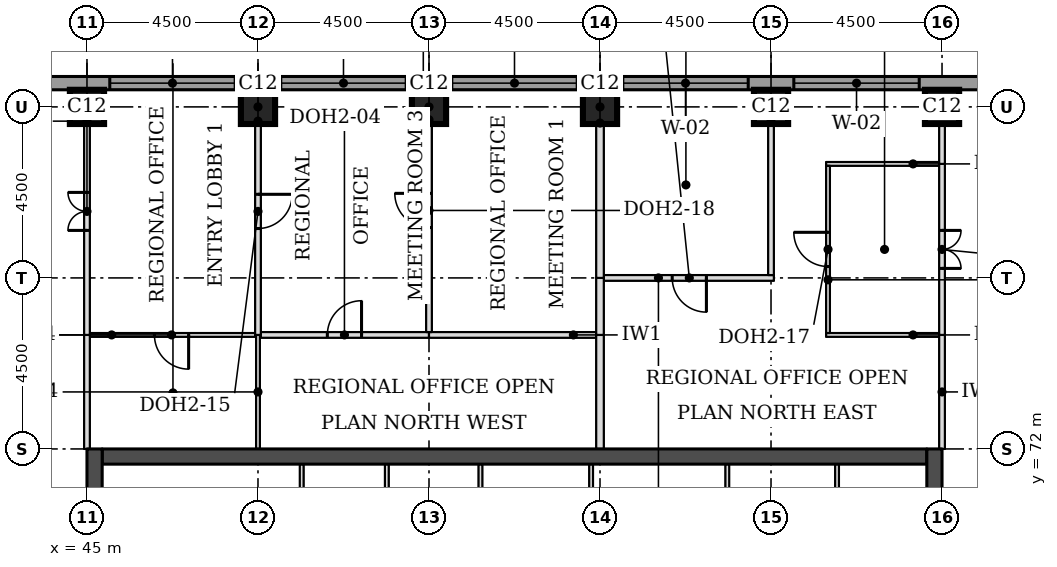
"""IFC4 building model, lengths in metres.
Left out: names, types, materials, properties, quantities, classifications, styles, units other than length and angle.
Written with IfcOpenShell. Run it as: python <this file> out.ifc"""

import sys

from ifc_helpers import new_model, si_unit, direction, frame, frame_2d, origin, origin_2d, place, context, subcontext, project, spatial, rectangle, extrude, element, fill, save


model = new_model("IFC4")
c1 = context("Model", 3, precision=1e-05, world=origin(), true_north=direction((0.0, 1.0)))
c2 = subcontext(c1, "Body", "Model", "MODEL_VIEW")
j1 = project(units=[si_unit("LENGTHUNIT", "METRE"), si_unit("PLANEANGLEUNIT", "RADIAN")], contexts=[c1])
p1 = place(None, origin())
s1 = spatial("IfcSite", under=j1, at=p1, CompositionType="ELEMENT")
p2 = place(p1, origin())
s2 = spatial("IfcBuilding", under=s1, at=p2, CompositionType="ELEMENT")
p3 = place(p2, frame((0.0, 0.0, 158.8)))
s3 = spatial("IfcBuildingStorey", under=s2, at=p3, CompositionType="ELEMENT", Elevation=158.8)
for number, where, z_axis, x_axis in (
    (1, (45.0, 81.0, 0.0), (0.0, 0.0, 1.0), (1.0, 0.0, 0.0)),
    (2, (49.5, 81.0, 0.0), (0.0, 0.0, 1.0), (1.0, 0.0, 0.0)),
    (3, (54.0, 81.0, 0.0), (0.0, 0.0, 1.0), (1.0, 0.0, 0.0)),
    (4, (58.5, 81.0, 0.0), (0.0, 0.0, 1.0), (1.0, 0.0, 0.0)),
    (5, (63.0, 81.0, 0.0), (0.0, 0.0, 1.0), (1.0, 0.0, 0.0)),
    (6, (67.5, 81.0, 0.0), (0.0, 0.0, 1.0), (1.0, 0.0, 0.0)),
):
    element("IfcColumn", number, at=place(p3, frame(where, z_axis=z_axis, x_axis=x_axis)), inside=s3, PredefinedType="COLUMN", context=c2, shape_type="SweptSolid", body=[
        extrude(rectangle(XDim=0.9, YDim=0.9, at=origin_2d()), origin(), (0.0, 0.0, 1.0), 3.7),
    ])
p4 = place(p3, frame((45.4, 71.8, 0.0), z_axis=(0.0, 0.0, 1.0), x_axis=(1.0, 0.0, 0.0)))
e7 = element("IfcWall", 7, at=p4, inside=s3, PredefinedType="SHEAR", context=c2, shape_type="SweptSolid", body=[
    extrude(rectangle(XDim=21.7, YDim=0.4, at=frame_2d((10.85, 0.0))), origin(), (0.0, 0.0, 1.0), 3.7),
])
p5 = place(p3, frame((45.2, 49.5, 0.0), z_axis=(0.0, 0.0, 1.0), x_axis=(0.0, 1.0, 0.0)))
e8 = element("IfcWall", 8, at=p5, inside=s3, PredefinedType="SHEAR", context=c2, shape_type="SweptSolid", body=[
    extrude(rectangle(XDim=22.5, YDim=0.4, at=frame_2d((11.25, 0.0))), origin(), (0.0, 0.0, 1.0), 3.7),
])
p6 = place(p5, frame((4.2, 0.0, 0.0)))
e9 = element("IfcOpeningElement", 9, at=p6, cuts=e8, PredefinedType="OPENING", context=c2, shape_type="SweptSolid", body=[
    extrude(rectangle(XDim=1.8, YDim=2.1, at=frame_2d((0.9, 1.05))), frame((0.0, 0.21, 0.0), z_axis=(0.0, -1.0, 0.0), x_axis=(1.0, 0.0, 0.0)), (0.0, 0.0, 1.0), 0.42),
])
p7 = place(p5, frame((6.9, 0.0, 0.0)))
e10 = element("IfcOpeningElement", 10, at=p7, cuts=e8, PredefinedType="OPENING", context=c2, shape_type="SweptSolid", body=[
    extrude(rectangle(XDim=1.1, YDim=2.1, at=frame_2d((0.55, 1.05))), frame((0.0, 0.21, 0.0), z_axis=(0.0, -1.0, 0.0), x_axis=(1.0, 0.0, 0.0)), (0.0, 0.0, 1.0), 0.42),
])
p8 = place(p5, frame((13.6, 0.0, 0.0)))
e11 = element("IfcOpeningElement", 11, at=p8, cuts=e8, PredefinedType="OPENING", context=c2, shape_type="SweptSolid", body=[
    extrude(rectangle(XDim=1.1, YDim=2.1, at=frame_2d((0.55, 1.05))), frame((0.0, 0.21, 0.0), z_axis=(0.0, -1.0, 0.0), x_axis=(1.0, 0.0, 0.0)), (0.0, 0.0, 1.0), 0.42),
])
p9 = place(p5, frame((16.5, 0.0, 0.0)))
e12 = element("IfcOpeningElement", 12, at=p9, cuts=e8, PredefinedType="OPENING", context=c2, shape_type="SweptSolid", body=[
    extrude(rectangle(XDim=1.8, YDim=2.1, at=frame_2d((0.9, 1.05))), frame((0.0, 0.21, 0.0), z_axis=(0.0, -1.0, 0.0), x_axis=(1.0, 0.0, 0.0)), (0.0, 0.0, 1.0), 0.42),
])
p10 = place(p3, frame((67.3, 49.5, 0.0), z_axis=(0.0, 0.0, 1.0), x_axis=(0.0, 1.0, 0.0)))
e13 = element("IfcWall", 13, at=p10, inside=s3, PredefinedType="SHEAR", context=c2, shape_type="SweptSolid", body=[
    extrude(rectangle(XDim=22.5, YDim=0.4, at=frame_2d((11.25, 0.0))), origin(), (0.0, 0.0, 1.0), 3.7),
])
p11 = place(p10, frame((4.2, 0.0, 0.0)))
e14 = element("IfcOpeningElement", 14, at=p11, cuts=e13, PredefinedType="OPENING", context=c2, shape_type="SweptSolid", body=[
    extrude(rectangle(XDim=1.8, YDim=2.1, at=frame_2d((0.9, 1.05))), frame((0.0, 0.21, 0.0), z_axis=(0.0, -1.0, 0.0), x_axis=(1.0, 0.0, 0.0)), (0.0, 0.0, 1.0), 0.42),
])
p12 = place(p10, frame((6.9, 0.0, 0.0)))
e15 = element("IfcOpeningElement", 15, at=p12, cuts=e13, PredefinedType="OPENING", context=c2, shape_type="SweptSolid", body=[
    extrude(rectangle(XDim=1.1, YDim=2.1, at=frame_2d((0.55, 1.05))), frame((0.0, 0.21, 0.0), z_axis=(0.0, -1.0, 0.0), x_axis=(1.0, 0.0, 0.0)), (0.0, 0.0, 1.0), 0.42),
])
p13 = place(p10, frame((13.6, 0.0, 0.0)))
e16 = element("IfcOpeningElement", 16, at=p13, cuts=e13, PredefinedType="OPENING", context=c2, shape_type="SweptSolid", body=[
    extrude(rectangle(XDim=1.1, YDim=2.1, at=frame_2d((0.55, 1.05))), frame((0.0, 0.21, 0.0), z_axis=(0.0, -1.0, 0.0), x_axis=(1.0, 0.0, 0.0)), (0.0, 0.0, 1.0), 0.42),
])
p14 = place(p10, frame((16.5, 0.0, 0.0)))
e17 = element("IfcOpeningElement", 17, at=p14, cuts=e13, PredefinedType="OPENING", context=c2, shape_type="SweptSolid", body=[
    extrude(rectangle(XDim=1.8, YDim=2.1, at=frame_2d((0.9, 1.05))), frame((0.0, 0.21, 0.0), z_axis=(0.0, -1.0, 0.0), x_axis=(1.0, 0.0, 0.0)), (0.0, 0.0, 1.0), 0.42),
])
p15 = place(p3, frame((72.331, 81.625, 0.0), z_axis=(0.0, 0.0, 1.0), x_axis=(-1.0, 0.0, 0.0)))
e18 = element("IfcWall", 18, at=p15, inside=s3, PredefinedType="STANDARD", context=c2, shape_type="SweptSolid", body=[
    extrude(rectangle(XDim=32.163, YDim=0.35, at=frame_2d((16.081, 0.0))), origin(), (0.0, 0.0, 1.0), 3.525),
])
p16 = place(p15, frame((5.431, 0.0, 0.9)))
e19 = element("IfcOpeningElement", 19, at=p16, cuts=e18, PredefinedType="OPENING", context=c2, shape_type="SweptSolid", body=[
    extrude(rectangle(XDim=3.3, YDim=1.9, at=frame_2d((1.65, 0.95))), frame((0.0, 0.185, 0.0), z_axis=(0.0, -1.0, 0.0), x_axis=(1.0, 0.0, 0.0)), (0.0, 0.0, 1.0), 0.37),
])
p17 = place(p15, frame((9.931, 0.0, 0.9)))
e20 = element("IfcOpeningElement", 20, at=p17, cuts=e18, PredefinedType="OPENING", context=c2, shape_type="SweptSolid", body=[
    extrude(rectangle(XDim=3.3, YDim=1.9, at=frame_2d((1.65, 0.95))), frame((0.0, 0.185, 0.0), z_axis=(0.0, -1.0, 0.0), x_axis=(1.0, 0.0, 0.0)), (0.0, 0.0, 1.0), 0.37),
])
p18 = place(p15, frame((14.431, 0.0, 0.9)))
e21 = element("IfcOpeningElement", 21, at=p18, cuts=e18, PredefinedType="OPENING", context=c2, shape_type="SweptSolid", body=[
    extrude(rectangle(XDim=3.3, YDim=1.9, at=frame_2d((1.65, 0.95))), frame((0.0, 0.185, 0.0), z_axis=(0.0, -1.0, 0.0), x_axis=(1.0, 0.0, 0.0)), (0.0, 0.0, 1.0), 0.37),
])
p19 = place(p15, frame((18.931, 0.0, 0.9)))
e22 = element("IfcOpeningElement", 22, at=p19, cuts=e18, PredefinedType="OPENING", context=c2, shape_type="SweptSolid", body=[
    extrude(rectangle(XDim=3.3, YDim=1.9, at=frame_2d((1.65, 0.95))), frame((0.0, 0.185, 0.0), z_axis=(0.0, -1.0, 0.0), x_axis=(1.0, 0.0, 0.0)), (0.0, 0.0, 1.0), 0.37),
])
p20 = place(p15, frame((23.431, 0.0, 0.9)))
e23 = element("IfcOpeningElement", 23, at=p20, cuts=e18, PredefinedType="OPENING", context=c2, shape_type="SweptSolid", body=[
    extrude(rectangle(XDim=3.3, YDim=1.9, at=frame_2d((1.65, 0.95))), frame((0.0, 0.185, 0.0), z_axis=(0.0, -1.0, 0.0), x_axis=(1.0, 0.0, 0.0)), (0.0, 0.0, 1.0), 0.37),
])
p21 = place(p3, frame((45.075, 75.0, 0.0), z_axis=(0.0, 0.0, 1.0), x_axis=(1.0, 0.0, 0.0)))
e24 = element("IfcWall", 24, at=p21, inside=s3, PredefinedType="PARTITIONING", context=c2, shape_type="SweptSolid", body=[
    extrude(rectangle(XDim=4.35, YDim=0.1, at=frame_2d((2.175, 0.0))), origin(), (0.0, 0.0, 1.0), 3.55),
])
p22 = place(p21, frame((1.7, 0.0, 0.0)))
e25 = element("IfcOpeningElement", 25, at=p22, cuts=e24, PredefinedType="OPENING", context=c2, shape_type="SweptSolid", body=[
    extrude(rectangle(XDim=0.9, YDim=2.1, at=frame_2d((0.45, 1.05))), frame((0.0, 0.06, 0.0), z_axis=(0.0, -1.0, 0.0), x_axis=(1.0, 0.0, 0.0)), (0.0, 0.0, 1.0), 0.12),
])
p23 = place(p3, frame((49.575, 75.0, 0.0), z_axis=(0.0, 0.0, 1.0), x_axis=(1.0, 0.0, 0.0)))
e26 = element("IfcWall", 26, at=p23, inside=s3, PredefinedType="PARTITIONING", context=c2, shape_type="SweptSolid", body=[
    extrude(rectangle(XDim=4.425, YDim=0.15, at=frame_2d((2.212, 0.0))), origin(), (0.0, 0.0, 1.0), 3.55),
])
p24 = place(p23, frame((1.75, 0.0, 0.0)))
e27 = element("IfcOpeningElement", 27, at=p24, cuts=e26, PredefinedType="OPENING", context=c2, shape_type="SweptSolid", body=[
    extrude(rectangle(XDim=0.9, YDim=2.1, at=frame_2d((0.45, 1.05))), frame((0.0, 0.085, 0.0), z_axis=(0.0, -1.0, 0.0), x_axis=(1.0, 0.0, 0.0)), (0.0, 0.0, 1.0), 0.17),
])
p25 = place(p3, frame((54.0, 75.0, 0.0), z_axis=(0.0, 0.0, 1.0), x_axis=(1.0, 0.0, 0.0)))
e28 = element("IfcWall", 28, at=p25, inside=s3, PredefinedType="PARTITIONING", context=c2, shape_type="SweptSolid", body=[
    extrude(rectangle(XDim=4.4, YDim=0.15, at=frame_2d((2.2, 0.0))), origin(), (0.0, 0.0, 1.0), 3.55),
])
p26 = place(p3, frame((64.45, 75.0, 0.0), z_axis=(0.0, 0.0, 1.0), x_axis=(1.0, 0.0, 0.0)))
e29 = element("IfcWall", 29, at=p26, inside=s3, PredefinedType="PARTITIONING", context=c2, shape_type="SweptSolid", body=[
    extrude(rectangle(XDim=2.975, YDim=0.1, at=frame_2d((1.488, 0.0))), origin(), (0.0, 0.0, 1.0), 3.55),
])
p27 = place(p3, frame((58.6, 76.5, 0.0), z_axis=(0.0, 0.0, 1.0), x_axis=(1.0, 0.0, 0.0)))
e30 = element("IfcWall", 30, at=p27, inside=s3, PredefinedType="PARTITIONING", context=c2, shape_type="SweptSolid", body=[
    extrude(rectangle(XDim=4.475, YDim=0.15, at=frame_2d((2.237, 0.0))), origin(), (0.0, 0.0, 1.0), 3.55),
])
p28 = place(p27, frame((1.8, 0.0, 0.0)))
e31 = element("IfcOpeningElement", 31, at=p28, cuts=e30, PredefinedType="OPENING", context=c2, shape_type="SweptSolid", body=[
    extrude(rectangle(XDim=0.9, YDim=2.1, at=frame_2d((0.45, 1.05))), frame((0.0, 0.085, 0.0), z_axis=(0.0, -1.0, 0.0), x_axis=(1.0, 0.0, 0.0)), (0.0, 0.0, 1.0), 0.17),
])
p29 = place(p3, frame((64.45, 79.5, 0.0), z_axis=(0.0, 0.0, 1.0), x_axis=(1.0, 0.0, 0.0)))
e32 = element("IfcWall", 32, at=p29, inside=s3, PredefinedType="PARTITIONING", context=c2, shape_type="SweptSolid", body=[
    extrude(rectangle(XDim=2.975, YDim=0.1, at=frame_2d((1.488, 0.0))), origin(), (0.0, 0.0, 1.0), 3.55),
])
p30 = place(p3, frame((45.0, 72.0, 0.0), z_axis=(0.0, 0.0, 1.0), x_axis=(0.0, 1.0, 0.0)))
e33 = element("IfcWall", 33, at=p30, inside=s3, PredefinedType="PARTITIONING", context=c2, shape_type="SweptSolid", body=[
    extrude(rectangle(XDim=3.0, YDim=0.15, at=frame_2d((1.5, 0.0))), origin(), (0.0, 0.0, 1.0), 3.022),
])
p31 = place(p3, frame((49.5, 72.0, 0.0), z_axis=(0.0, 0.0, 1.0), x_axis=(0.0, 1.0, 0.0)))
e34 = element("IfcWall", 34, at=p31, inside=s3, PredefinedType="PARTITIONING", context=c2, shape_type="SweptSolid", body=[
    extrude(rectangle(XDim=3.0, YDim=0.1, at=frame_2d((1.5, 0.0))), origin(), (0.0, 0.0, 1.0), 3.55),
])
p32 = place(p3, frame((58.5, 72.0, 0.0), z_axis=(0.0, 0.0, 1.0), x_axis=(0.0, 1.0, 0.0)))
e35 = element("IfcWall", 35, at=p32, inside=s3, PredefinedType="PARTITIONING", context=c2, shape_type="SweptSolid", body=[
    extrude(rectangle(XDim=3.0, YDim=0.2, at=frame_2d((1.5, 0.0))), origin(), (0.0, 0.0, 1.0), 3.55),
])
p33 = place(p3, frame((67.5, 72.0, 0.0), z_axis=(0.0, 0.0, 1.0), x_axis=(0.0, 1.0, 0.0)))
e36 = element("IfcWall", 36, at=p33, inside=s3, PredefinedType="PARTITIONING", context=c2, shape_type="SweptSolid", body=[
    extrude(rectangle(XDim=3.0, YDim=0.15, at=frame_2d((1.5, 0.0))), origin(), (0.0, 0.0, 1.0), 3.022),
])
p34 = place(p3, frame((45.0, 75.0, 0.0), z_axis=(0.0, 0.0, 1.0), x_axis=(0.0, 1.0, 0.0)))
e37 = element("IfcWall", 37, at=p34, inside=s3, PredefinedType="PARTITIONING", context=c2, shape_type="SweptSolid", body=[
    extrude(rectangle(XDim=6.45, YDim=0.15, at=frame_2d((3.225, 0.0))), origin(), (0.0, 0.0, 1.0), 3.022),
])
p35 = place(p34, frame((2.75, 0.0, 0.0)))
e38 = element("IfcOpeningElement", 38, at=p35, cuts=e37, PredefinedType="OPENING", context=c2, shape_type="SweptSolid", body=[
    extrude(rectangle(XDim=1.0, YDim=2.1, at=frame_2d((0.5, 1.05))), frame((0.0, 0.085, 0.0), z_axis=(0.0, -1.0, 0.0), x_axis=(1.0, 0.0, 0.0)), (0.0, 0.0, 1.0), 0.17),
])
p36 = place(p3, frame((49.5, 75.0, 0.0), z_axis=(0.0, 0.0, 1.0), x_axis=(0.0, 1.0, 0.0)))
e39 = element("IfcWall", 39, at=p36, inside=s3, PredefinedType="PARTITIONING", context=c2, shape_type="SweptSolid", body=[
    extrude(rectangle(XDim=6.45, YDim=0.15, at=frame_2d((3.225, 0.0))), origin(), (0.0, 0.0, 1.0), 3.55),
])
p37 = place(p36, frame((2.8, 0.0, 0.0)))
e40 = element("IfcOpeningElement", 40, at=p37, cuts=e39, PredefinedType="OPENING", context=c2, shape_type="SweptSolid", body=[
    extrude(rectangle(XDim=0.9, YDim=2.1, at=frame_2d((0.45, 1.05))), frame((0.0, 0.085, 0.0), z_axis=(0.0, -1.0, 0.0), x_axis=(1.0, 0.0, 0.0)), (0.0, 0.0, 1.0), 0.17),
])
p38 = place(p3, frame((58.5, 75.0, 0.0), z_axis=(0.0, 0.0, 1.0), x_axis=(0.0, 1.0, 0.0)))
e41 = element("IfcWall", 41, at=p38, inside=s3, PredefinedType="PARTITIONING", context=c2, shape_type="SweptSolid", body=[
    extrude(rectangle(XDim=1.5, YDim=0.2, at=frame_2d((0.75, 0.0))), origin(), (0.0, 0.0, 1.0), 3.55),
])
p39 = place(p3, frame((67.5, 75.0, 0.0), z_axis=(0.0, 0.0, 1.0), x_axis=(0.0, 1.0, 0.0)))
e42 = element("IfcWall", 42, at=p39, inside=s3, PredefinedType="PARTITIONING", context=c2, shape_type="SweptSolid", body=[
    extrude(rectangle(XDim=4.5, YDim=0.15, at=frame_2d((2.25, 0.0))), origin(), (0.0, 0.0, 1.0), 3.022),
])
p40 = place(p39, frame((1.75, 0.0, 0.0)))
e43 = element("IfcOpeningElement", 43, at=p40, cuts=e42, PredefinedType="OPENING", context=c2, shape_type="SweptSolid", body=[
    extrude(rectangle(XDim=1.0, YDim=2.1, at=frame_2d((0.5, 1.05))), frame((0.0, 0.085, 0.0), z_axis=(0.0, -1.0, 0.0), x_axis=(1.0, 0.0, 0.0)), (0.0, 0.0, 1.0), 0.17),
])
p41 = place(p3, frame((64.5, 75.05, 0.0), z_axis=(0.0, 0.0, 1.0), x_axis=(0.0, 1.0, 0.0)))
e44 = element("IfcWall", 44, at=p41, inside=s3, PredefinedType="PARTITIONING", context=c2, shape_type="SweptSolid", body=[
    extrude(rectangle(XDim=4.4, YDim=0.1, at=frame_2d((2.2, 0.0))), origin(), (0.0, 0.0, 1.0), 3.55),
])
p42 = place(p41, frame((1.75, 0.0, 0.0)))
e45 = element("IfcOpeningElement", 45, at=p42, cuts=e44, PredefinedType="OPENING", context=c2, shape_type="SweptSolid", body=[
    extrude(rectangle(XDim=0.9, YDim=2.1, at=frame_2d((0.45, 1.05))), frame((0.0, 0.06, 0.0), z_axis=(0.0, -1.0, 0.0), x_axis=(1.0, 0.0, 0.0)), (0.0, 0.0, 1.0), 0.12),
])
p43 = place(p3, frame((54.0, 75.075, 0.0), z_axis=(0.0, 0.0, 1.0), x_axis=(0.0, 1.0, 0.0)))
e46 = element("IfcWall", 46, at=p43, inside=s3, PredefinedType="PARTITIONING", context=c2, shape_type="SweptSolid", body=[
    extrude(rectangle(XDim=6.375, YDim=0.15, at=frame_2d((3.188, 0.0))), origin(), (0.0, 0.0, 1.0), 3.55),
])
p44 = place(p43, frame((2.75, 0.0, 0.0)))
e47 = element("IfcOpeningElement", 47, at=p44, cuts=e46, PredefinedType="OPENING", context=c2, shape_type="SweptSolid", body=[
    extrude(rectangle(XDim=0.9, YDim=2.1, at=frame_2d((0.45, 1.05))), frame((0.0, 0.085, 0.0), z_axis=(0.0, -1.0, 0.0), x_axis=(1.0, 0.0, 0.0)), (0.0, 0.0, 1.0), 0.17),
])
p45 = place(p3, frame((58.5, 76.5, 0.0), z_axis=(0.0, 0.0, 1.0), x_axis=(0.0, 1.0, 0.0)))
e48 = element("IfcWall", 48, at=p45, inside=s3, PredefinedType="PARTITIONING", context=c2, shape_type="SweptSolid", body=[
    extrude(rectangle(XDim=4.95, YDim=0.2, at=frame_2d((2.475, 0.0))), origin(), (0.0, 0.0, 1.0), 3.55),
])
p46 = place(p3, frame((63.0, 76.575, 0.0), z_axis=(0.0, 0.0, 1.0), x_axis=(0.0, 1.0, 0.0)))
e49 = element("IfcWall", 49, at=p46, inside=s3, PredefinedType="PARTITIONING", context=c2, shape_type="SweptSolid", body=[
    extrude(rectangle(XDim=4.875, YDim=0.15, at=frame_2d((2.438, 0.0))), origin(), (0.0, 0.0, 1.0), 3.55),
])
p47 = place(p3, frame((67.5, 79.5, 0.0), z_axis=(0.0, 0.0, 1.0), x_axis=(0.0, 1.0, 0.0)))
e50 = element("IfcWall", 50, at=p47, inside=s3, PredefinedType="PARTITIONING", context=c2, shape_type="SweptSolid", body=[
    extrude(rectangle(XDim=1.95, YDim=0.15, at=frame_2d((0.975, 0.0))), origin(), (0.0, 0.0, 1.0), 3.022),
])
for number, where, z_axis, x_axis in (
    (51, (50.65, 68.5, 0.0), (0.0, 0.0, 1.0), (0.0, 1.0, 0.0)),
    (52, (52.89, 68.5, 0.0), (0.0, 0.0, 1.0), (0.0, 1.0, 0.0)),
    (53, (55.354, 68.5, 0.0), (0.0, 0.0, 1.0), (0.0, 1.0, 0.0)),
    (54, (58.266, 68.5, 0.0), (0.0, 0.0, 1.0), (0.0, 1.0, 0.0)),
    (55, (61.85, 68.5, 0.0), (0.0, 0.0, 1.0), (0.0, 1.0, 0.0)),
    (56, (64.738, 68.5, 0.0), (0.0, 0.0, 1.0), (0.0, 1.0, 0.0)),
):
    element("IfcWall", number, at=place(p3, frame(where, z_axis=z_axis, x_axis=x_axis)), inside=s3, PredefinedType="PARTITIONING", context=c2, shape_type="SweptSolid", body=[
        extrude(rectangle(XDim=3.1, YDim=0.1, at=frame_2d((1.55, 0.0))), origin(), (0.0, 0.0, 1.0), 3.55),
    ])
p48 = place(p16, origin())
e57 = element("IfcWindow", 57, at=p48, inside=s3, PartitioningType="SINGLE_PANEL", PredefinedType="WINDOW", context=c2, shape_type="SweptSolid", body=[
    extrude(rectangle(XDim=3.3, YDim=1.9, at=frame_2d((1.65, 0.95))), frame((0.0, 0.085, 0.0), z_axis=(0.0, -1.0, 0.0), x_axis=(1.0, 0.0, 0.0)), (0.0, 0.0, 1.0), 0.06),
])
fill(e19, e57)
p49 = place(p17, origin())
e58 = element("IfcWindow", 58, at=p49, inside=s3, PartitioningType="SINGLE_PANEL", PredefinedType="WINDOW", context=c2, shape_type="SweptSolid", body=[
    extrude(rectangle(XDim=3.3, YDim=1.9, at=frame_2d((1.65, 0.95))), frame((0.0, 0.085, 0.0), z_axis=(0.0, -1.0, 0.0), x_axis=(1.0, 0.0, 0.0)), (0.0, 0.0, 1.0), 0.06),
])
fill(e20, e58)
p50 = place(p18, origin())
e59 = element("IfcWindow", 59, at=p50, inside=s3, PartitioningType="SINGLE_PANEL", PredefinedType="WINDOW", context=c2, shape_type="SweptSolid", body=[
    extrude(rectangle(XDim=3.3, YDim=1.9, at=frame_2d((1.65, 0.95))), frame((0.0, 0.085, 0.0), z_axis=(0.0, -1.0, 0.0), x_axis=(1.0, 0.0, 0.0)), (0.0, 0.0, 1.0), 0.06),
])
fill(e21, e59)
p51 = place(p19, origin())
e60 = element("IfcWindow", 60, at=p51, inside=s3, PartitioningType="SINGLE_PANEL", PredefinedType="WINDOW", context=c2, shape_type="SweptSolid", body=[
    extrude(rectangle(XDim=3.3, YDim=1.9, at=frame_2d((1.65, 0.95))), frame((0.0, 0.085, 0.0), z_axis=(0.0, -1.0, 0.0), x_axis=(1.0, 0.0, 0.0)), (0.0, 0.0, 1.0), 0.06),
])
fill(e22, e60)
p52 = place(p20, origin())
e61 = element("IfcWindow", 61, at=p52, inside=s3, PartitioningType="SINGLE_PANEL", PredefinedType="WINDOW", context=c2, shape_type="SweptSolid", body=[
    extrude(rectangle(XDim=3.3, YDim=1.9, at=frame_2d((1.65, 0.95))), frame((0.0, 0.085, 0.0), z_axis=(0.0, -1.0, 0.0), x_axis=(1.0, 0.0, 0.0)), (0.0, 0.0, 1.0), 0.06),
])
fill(e23, e61)
p53 = place(p35, origin())
e62 = element("IfcDoor", 62, at=p53, inside=s3, OperationType="DOUBLE_DOOR_SINGLE_SWING", PredefinedType="DOOR", context=c2, shape_type="SweptSolid", body=[
    extrude(rectangle(XDim=1.0, YDim=2.1, at=frame_2d((0.5, 1.05))), frame((0.0, 0.025, 0.0), z_axis=(0.0, -1.0, 0.0), x_axis=(1.0, 0.0, 0.0)), (0.0, 0.0, 1.0), 0.05),
])
fill(e38, e62)
p54 = place(p37, frame((0.9, 0.0, 0.0), z_axis=(0.0, 0.0, 1.0), x_axis=(-1.0, 0.0, 0.0)))
e63 = element("IfcDoor", 63, at=p54, inside=s3, OperationType="SINGLE_SWING_LEFT", PredefinedType="DOOR", context=c2, shape_type="SweptSolid", body=[
    extrude(rectangle(XDim=0.9, YDim=2.1, at=frame_2d((0.45, 1.05))), frame((0.0, 0.025, 0.0), z_axis=(0.0, -1.0, 0.0), x_axis=(1.0, 0.0, 0.0)), (0.0, 0.0, 1.0), 0.05),
])
fill(e40, e63)
p55 = place(p44, origin())
e64 = element("IfcDoor", 64, at=p55, inside=s3, OperationType="SINGLE_SWING_RIGHT", PredefinedType="DOOR", context=c2, shape_type="SweptSolid", body=[
    extrude(rectangle(XDim=0.9, YDim=2.1, at=frame_2d((0.45, 1.05))), frame((0.0, 0.025, 0.0), z_axis=(0.0, -1.0, 0.0), x_axis=(1.0, 0.0, 0.0)), (0.0, 0.0, 1.0), 0.05),
])
fill(e47, e64)
p56 = place(p22, frame((0.9, 0.0, 0.0), z_axis=(0.0, 0.0, 1.0), x_axis=(-1.0, 0.0, 0.0)))
e65 = element("IfcDoor", 65, at=p56, inside=s3, OperationType="SINGLE_SWING_LEFT", PredefinedType="DOOR", context=c2, shape_type="SweptSolid", body=[
    extrude(rectangle(XDim=0.9, YDim=2.1, at=frame_2d((0.45, 1.05))), frame((0.0, 0.025, 0.0), z_axis=(0.0, -1.0, 0.0), x_axis=(1.0, 0.0, 0.0)), (0.0, 0.0, 1.0), 0.05),
])
fill(e25, e65)
p57 = place(p24, origin())
e66 = element("IfcDoor", 66, at=p57, inside=s3, OperationType="SINGLE_SWING_RIGHT", PredefinedType="DOOR", context=c2, shape_type="SweptSolid", body=[
    extrude(rectangle(XDim=0.9, YDim=2.1, at=frame_2d((0.45, 1.05))), frame((0.0, 0.025, 0.0), z_axis=(0.0, -1.0, 0.0), x_axis=(1.0, 0.0, 0.0)), (0.0, 0.0, 1.0), 0.05),
])
fill(e27, e66)
p58 = place(p40, frame((1.0, 0.0, 0.0), z_axis=(0.0, 0.0, 1.0), x_axis=(-1.0, 0.0, 0.0)))
e67 = element("IfcDoor", 67, at=p58, inside=s3, OperationType="DOUBLE_DOOR_SINGLE_SWING", PredefinedType="DOOR", context=c2, shape_type="SweptSolid", body=[
    extrude(rectangle(XDim=1.0, YDim=2.1, at=frame_2d((0.5, 1.05))), frame((0.0, 0.025, 0.0), z_axis=(0.0, -1.0, 0.0), x_axis=(1.0, 0.0, 0.0)), (0.0, 0.0, 1.0), 0.05),
])
fill(e43, e67)
p59 = place(p42, origin())
e68 = element("IfcDoor", 68, at=p59, inside=s3, OperationType="SINGLE_SWING_RIGHT", PredefinedType="DOOR", context=c2, shape_type="SweptSolid", body=[
    extrude(rectangle(XDim=0.9, YDim=2.1, at=frame_2d((0.45, 1.05))), frame((0.0, 0.025, 0.0), z_axis=(0.0, -1.0, 0.0), x_axis=(1.0, 0.0, 0.0)), (0.0, 0.0, 1.0), 0.05),
])
fill(e45, e68)
p60 = place(p28, frame((0.9, 0.0, 0.0), z_axis=(0.0, 0.0, 1.0), x_axis=(-1.0, 0.0, 0.0)))
e69 = element("IfcDoor", 69, at=p60, inside=s3, OperationType="SINGLE_SWING_LEFT", PredefinedType="DOOR", context=c2, shape_type="SweptSolid", body=[
    extrude(rectangle(XDim=0.9, YDim=2.1, at=frame_2d((0.45, 1.05))), frame((0.0, 0.025, 0.0), z_axis=(0.0, -1.0, 0.0), x_axis=(1.0, 0.0, 0.0)), (0.0, 0.0, 1.0), 0.05),
])
fill(e31, e69)
save(model, sys.argv[1])
